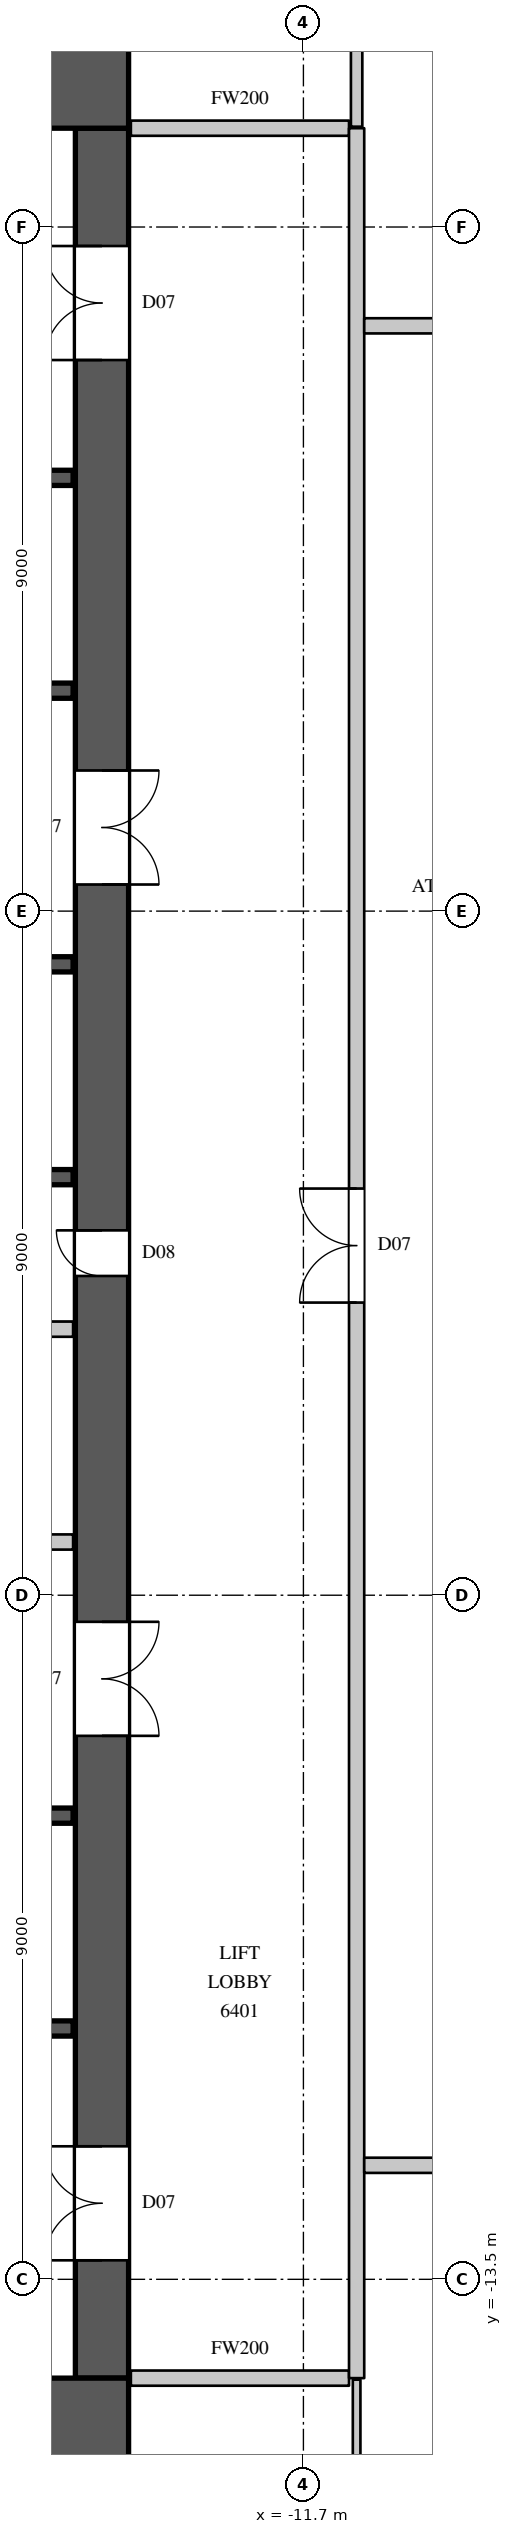
"""IFC4 building model, lengths in metres.
Left out: names, types, materials, properties, quantities, classifications, styles, units other than length and angle.
Written with IfcOpenShell. Run it as: python <this file> out.ifc"""

import sys

from ifc_helpers import new_model, si_unit, direction, frame, frame_2d, origin, place, context, subcontext, project, spatial, rectangle, extrude, element, fill, save


model = new_model("IFC4")
c1 = context("Model", 3, precision=1e-05, world=origin(), true_north=direction((0.0, 1.0)))
c2 = subcontext(c1, "Body", "Model", "MODEL_VIEW")
j1 = project(units=[si_unit("LENGTHUNIT", "METRE"), si_unit("PLANEANGLEUNIT", "RADIAN")], contexts=[c1])
p1 = place(None, origin())
s1 = spatial("IfcSite", under=j1, at=p1, CompositionType="ELEMENT")
p2 = place(p1, origin())
s2 = spatial("IfcBuilding", under=s1, at=p2, CompositionType="ELEMENT")
p3 = place(p2, frame((0.0, 0.0, 284.4)))
s3 = spatial("IfcBuildingStorey", under=s2, at=p3, CompositionType="ELEMENT", Elevation=284.4)
for number, where, z_axis, x_axis in (
    (1, (-30.0, 15.4, 0.0), (0.0, 0.0, 1.0), (1.0, 0.0, 0.0)),
    (2, (-30.0, -15.4, 0.0), (0.0, 0.0, 1.0), (1.0, 0.0, 0.0)),
):
    element("IfcWall", number, at=place(p3, frame(where, z_axis=z_axis, x_axis=x_axis)), inside=s3, PredefinedType="SHEAR", context=c2, shape_type="SweptSolid", body=[
        extrude(rectangle(XDim=16.0, YDim=1.2, at=frame_2d((8.0, 0.0))), origin(), (0.0, 0.0, 1.0), 4.1),
    ])
p4 = place(p3, frame((-14.35, -14.8, 0.0), z_axis=(0.0, 0.0, 1.0), x_axis=(0.0, 1.0, 0.0)))
e3 = element("IfcWall", 3, at=p4, inside=s3, PredefinedType="SHEAR", context=c2, shape_type="SweptSolid", body=[
    extrude(rectangle(XDim=29.6, YDim=0.7, at=frame_2d((14.8, 0.0))), origin(), (0.0, 0.0, 1.0), 4.1),
])
p5 = place(p4, frame((1.55, 0.0, 0.0)))
e4 = element("IfcOpeningElement", 4, at=p5, cuts=e3, PredefinedType="OPENING", context=c2, shape_type="SweptSolid", body=[
    extrude(rectangle(XDim=1.5, YDim=2.4, at=frame_2d((0.75, 1.2))), frame((0.0, 0.36, 0.0), z_axis=(0.0, -1.0, 0.0), x_axis=(1.0, 0.0, 0.0)), (0.0, 0.0, 1.0), 0.72),
])
p6 = place(p4, frame((26.55, 0.0, 0.0)))
e5 = element("IfcOpeningElement", 5, at=p6, cuts=e3, PredefinedType="OPENING", context=c2, shape_type="SweptSolid", body=[
    extrude(rectangle(XDim=1.5, YDim=2.4, at=frame_2d((0.75, 1.2))), frame((0.0, 0.36, 0.0), z_axis=(0.0, -1.0, 0.0), x_axis=(1.0, 0.0, 0.0)), (0.0, 0.0, 1.0), 0.72),
])
p7 = place(p4, frame((8.45, 0.0, 0.0)))
e6 = element("IfcOpeningElement", 6, at=p7, cuts=e3, PredefinedType="OPENING", context=c2, shape_type="SweptSolid", body=[
    extrude(rectangle(XDim=1.5, YDim=2.4, at=frame_2d((0.75, 1.2))), frame((0.0, 0.36, 0.0), z_axis=(0.0, -1.0, 0.0), x_axis=(1.0, 0.0, 0.0)), (0.0, 0.0, 1.0), 0.72),
])
p8 = place(p4, frame((19.65, 0.0, 0.0)))
e7 = element("IfcOpeningElement", 7, at=p8, cuts=e3, PredefinedType="OPENING", context=c2, shape_type="SweptSolid", body=[
    extrude(rectangle(XDim=1.5, YDim=2.4, at=frame_2d((0.75, 1.2))), frame((0.0, 0.36, 0.0), z_axis=(0.0, -1.0, 0.0), x_axis=(1.0, 0.0, 0.0)), (0.0, 0.0, 1.0), 0.72),
])
p9 = place(p4, frame((14.5, 0.0, 0.0)))
e8 = element("IfcOpeningElement", 8, at=p9, cuts=e3, PredefinedType="OPENING", context=c2, shape_type="SweptSolid", body=[
    extrude(rectangle(XDim=0.6, YDim=2.0, at=frame_2d((0.3, 1.0))), frame((0.0, 0.36, 0.0), z_axis=(0.0, -1.0, 0.0), x_axis=(1.0, 0.0, 0.0)), (0.0, 0.0, 1.0), 0.72),
])
p10 = place(p3, frame((-29.27, -3.8, 0.0), z_axis=(0.0, 0.0, 1.0), x_axis=(1.0, 0.0, 0.0)))
e9 = element("IfcWall", 9, at=p10, inside=s3, PredefinedType="PARTITIONING", context=c2, shape_type="SweptSolid", body=[
    extrude(rectangle(XDim=14.54, YDim=0.2, at=frame_2d((7.27, 0.0))), origin(), (0.0, 0.0, 1.0), 3.8),
])
p11 = place(p10, frame((1.15, 0.0, 0.0)))
e10 = element("IfcOpeningElement", 10, at=p11, cuts=e9, PredefinedType="OPENING", context=c2, shape_type="SweptSolid", body=[
    extrude(rectangle(XDim=0.9, YDim=2.2, at=frame_2d((0.45, 1.1))), frame((0.0, 0.11, 0.0), z_axis=(0.0, -1.0, 0.0), x_axis=(1.0, 0.0, 0.0)), (0.0, 0.0, 1.0), 0.22),
])
p12 = place(p10, frame((5.0, 0.0, 0.0)))
e11 = element("IfcOpeningElement", 11, at=p12, cuts=e9, PredefinedType="OPENING", context=c2, shape_type="SweptSolid", body=[
    extrude(rectangle(XDim=0.9, YDim=2.2, at=frame_2d((0.45, 1.1))), frame((0.0, 0.11, 0.0), z_axis=(0.0, -1.0, 0.0), x_axis=(1.0, 0.0, 0.0)), (0.0, 0.0, 1.0), 0.22),
])
p13 = place(p10, frame((10.65, 0.0, 0.0)))
e12 = element("IfcOpeningElement", 12, at=p13, cuts=e9, PredefinedType="OPENING", context=c2, shape_type="SweptSolid", body=[
    extrude(rectangle(XDim=0.9, YDim=2.2, at=frame_2d((0.45, 1.1))), frame((0.0, 0.11, 0.0), z_axis=(0.0, -1.0, 0.0), x_axis=(1.0, 0.0, 0.0)), (0.0, 0.0, 1.0), 0.22),
])
for number, where, z_axis, x_axis in (
    (13, (-13.97, -14.8, 0.0), (0.0, 0.0, 1.0), (1.0, 0.0, 0.0)),
    (14, (-13.97, 14.8, 0.0), (0.0, 0.0, 1.0), (1.0, 0.0, 0.0)),
):
    element("IfcWall", number, at=place(p3, frame(where, z_axis=z_axis, x_axis=x_axis)), inside=s3, PredefinedType="PARTITIONING", context=c2, shape_type="SweptSolid", body=[
        extrude(rectangle(XDim=2.87, YDim=0.2, at=frame_2d((1.435, 0.0))), origin(), (0.0, 0.0, 1.0), 3.8),
    ])
p14 = place(p3, frame((-11.0, -14.8, 0.0), z_axis=(0.0, 0.0, 1.0), x_axis=(0.0, 1.0, 0.0)))
e15 = element("IfcWall", 15, at=p14, inside=s3, PredefinedType="PARTITIONING", context=c2, shape_type="SweptSolid", body=[
    extrude(rectangle(XDim=29.6, YDim=0.2, at=frame_2d((14.8, 0.0))), origin(), (0.0, 0.0, 1.0), 3.8),
])
p15 = place(p14, frame((14.15, 0.0, 0.0)))
e16 = element("IfcOpeningElement", 16, at=p15, cuts=e15, PredefinedType="OPENING", context=c2, shape_type="SweptSolid", body=[
    extrude(rectangle(XDim=1.5, YDim=2.4, at=frame_2d((0.75, 1.2))), frame((0.0, 0.11, 0.0), z_axis=(0.0, -1.0, 0.0), x_axis=(1.0, 0.0, 0.0)), (0.0, 0.0, 1.0), 0.22),
])
p16 = place(p3, frame((-10.9, -12.0, 0.0), z_axis=(0.0, 0.0, 1.0), x_axis=(1.0, 0.0, 0.0)))
e17 = element("IfcWall", 17, at=p16, inside=s3, PredefinedType="PARTITIONING", context=c2, shape_type="SweptSolid", body=[
    extrude(rectangle(XDim=21.8, YDim=0.2, at=frame_2d((10.9, 0.0))), origin(), (0.0, 0.0, 1.0), 3.8),
])
p17 = place(p16, frame((1.1, 0.0, 0.0)))
e18 = element("IfcOpeningElement", 18, at=p17, cuts=e17, PredefinedType="OPENING", context=c2, shape_type="SweptSolid", body=[
    extrude(rectangle(XDim=0.9, YDim=2.2, at=frame_2d((0.45, 1.1))), frame((0.0, 0.11, 0.0), z_axis=(0.0, -1.0, 0.0), x_axis=(1.0, 0.0, 0.0)), (0.0, 0.0, 1.0), 0.22),
])
p18 = place(p16, frame((4.9, 0.0, 0.0)))
e19 = element("IfcOpeningElement", 19, at=p18, cuts=e17, PredefinedType="OPENING", context=c2, shape_type="SweptSolid", body=[
    extrude(rectangle(XDim=0.9, YDim=2.2, at=frame_2d((0.45, 1.1))), frame((0.0, 0.11, 0.0), z_axis=(0.0, -1.0, 0.0), x_axis=(1.0, 0.0, 0.0)), (0.0, 0.0, 1.0), 0.22),
])
p19 = place(p16, frame((7.0, 0.0, 0.0)))
e20 = element("IfcOpeningElement", 20, at=p19, cuts=e17, PredefinedType="OPENING", context=c2, shape_type="SweptSolid", body=[
    extrude(rectangle(XDim=0.9, YDim=2.2, at=frame_2d((0.45, 1.1))), frame((0.0, 0.11, 0.0), z_axis=(0.0, -1.0, 0.0), x_axis=(1.0, 0.0, 0.0)), (0.0, 0.0, 1.0), 0.22),
])
p20 = place(p16, frame((9.95, 0.0, 0.0)))
e21 = element("IfcOpeningElement", 21, at=p20, cuts=e17, PredefinedType="OPENING", context=c2, shape_type="SweptSolid", body=[
    extrude(rectangle(XDim=1.1, YDim=2.4, at=frame_2d((0.55, 1.2))), frame((0.0, 0.11, 0.0), z_axis=(0.0, -1.0, 0.0), x_axis=(1.0, 0.0, 0.0)), (0.0, 0.0, 1.0), 0.22),
])
p21 = place(p3, frame((-10.9, 12.2, 0.0), z_axis=(0.0, 0.0, 1.0), x_axis=(1.0, 0.0, 0.0)))
e22 = element("IfcWall", 22, at=p21, inside=s3, PredefinedType="PARTITIONING", context=c2, shape_type="SweptSolid", body=[
    extrude(rectangle(XDim=3.756, YDim=0.2, at=frame_2d((1.878, 0.0))), origin(), (0.0, 0.0, 1.0), 3.8),
])
p22 = place(p21, frame((0.95, 0.0, 0.0)))
e23 = element("IfcOpeningElement", 23, at=p22, cuts=e22, PredefinedType="OPENING", context=c2, shape_type="SweptSolid", body=[
    extrude(rectangle(XDim=1.1, YDim=2.4, at=frame_2d((0.55, 1.2))), frame((0.0, 0.11, 0.0), z_axis=(0.0, -1.0, 0.0), x_axis=(1.0, 0.0, 0.0)), (0.0, 0.0, 1.0), 0.22),
])
p23 = place(p3, frame((-11.0, 14.82, 0.0), z_axis=(0.0, 0.0, 1.0), x_axis=(0.0, 1.0, 0.0)))
e24 = element("IfcWall", 24, at=p23, inside=s3, PredefinedType="PARTITIONING", context=c2, shape_type="SweptSolid", body=[
    extrude(rectangle(XDim=9.883, YDim=0.15, at=frame_2d((4.942, 0.0))), origin(), (0.0, 0.0, 1.0), 3.8),
])
p24 = place(p3, frame((-29.27, -1.0, 0.0), z_axis=(0.0, 0.0, 1.0), x_axis=(1.0, 0.0, 0.0)))
e25 = element("IfcWall", 25, at=p24, inside=s3, PredefinedType="PARTITIONING", context=c2, shape_type="SweptSolid", body=[
    extrude(rectangle(XDim=14.54, YDim=0.2, at=frame_2d((7.27, 0.0))), origin(), (0.0, 0.0, 1.0), 3.8),
])
p25 = place(p3, frame((-17.92, -10.2, 0.0), z_axis=(0.0, 0.0, 1.0), x_axis=(1.0, 0.0, 0.0)))
e26 = element("IfcWall", 26, at=p25, inside=s3, PredefinedType="SHEAR", context=c2, shape_type="SweptSolid", body=[
    extrude(rectangle(XDim=3.19, YDim=0.2, at=frame_2d((1.595, 0.0))), origin(), (0.0, 0.0, 1.0), 3.8),
])
p26 = place(p25, frame((1.05, 0.0, 0.0)))
e27 = element("IfcOpeningElement", 27, at=p26, cuts=e26, PredefinedType="OPENING", context=c2, shape_type="SweptSolid", body=[
    extrude(rectangle(XDim=1.1, YDim=2.2, at=frame_2d((0.55, 1.1))), frame((0.0, 0.11, 0.0), z_axis=(0.0, -1.0, 0.0), x_axis=(1.0, 0.0, 0.0)), (0.0, 0.0, 1.0), 0.22),
])
for number, where, z_axis, x_axis in (
    (28, (-17.9, -7.4, 0.0), (0.0, 0.0, 1.0), (1.0, 0.0, 0.0)),
    (29, (-17.9, 1.0, 0.0), (0.0, 0.0, 1.0), (1.0, 0.0, 0.0)),
):
    element("IfcWall", number, at=place(p3, frame(where, z_axis=z_axis, x_axis=x_axis)), inside=s3, PredefinedType="SHEAR", context=c2, shape_type="SweptSolid", body=[
        extrude(rectangle(XDim=3.17, YDim=0.2, at=frame_2d((1.585, 0.0))), origin(), (0.0, 0.0, 1.0), 3.8),
    ])
p27 = place(p3, frame((-17.9, 3.8, 0.0), z_axis=(0.0, 0.0, 1.0), x_axis=(1.0, 0.0, 0.0)))
e30 = element("IfcWall", 30, at=p27, inside=s3, PredefinedType="SHEAR", context=c2, shape_type="SweptSolid", body=[
    extrude(rectangle(XDim=3.17, YDim=0.2, at=frame_2d((1.585, 0.0))), origin(), (0.0, 0.0, 1.0), 3.8),
])
p28 = place(p27, frame((1.05, 0.0, 0.0)))
e31 = element("IfcOpeningElement", 31, at=p28, cuts=e30, PredefinedType="OPENING", context=c2, shape_type="SweptSolid", body=[
    extrude(rectangle(XDim=1.1, YDim=2.2, at=frame_2d((0.55, 1.1))), frame((0.0, 0.11, 0.0), z_axis=(0.0, -1.0, 0.0), x_axis=(1.0, 0.0, 0.0)), (0.0, 0.0, 1.0), 0.22),
])
p29 = place(p3, frame((-17.92, 7.4, 0.0), z_axis=(0.0, 0.0, 1.0), x_axis=(1.0, 0.0, 0.0)))
e32 = element("IfcWall", 32, at=p29, inside=s3, PredefinedType="SHEAR", context=c2, shape_type="SweptSolid", body=[
    extrude(rectangle(XDim=3.19, YDim=0.2, at=frame_2d((1.595, 0.0))), origin(), (0.0, 0.0, 1.0), 3.8),
])
p30 = place(p3, frame((-17.92, 10.2, 0.0), z_axis=(0.0, 0.0, 1.0), x_axis=(1.0, 0.0, 0.0)))
e33 = element("IfcWall", 33, at=p30, inside=s3, PredefinedType="SHEAR", context=c2, shape_type="SweptSolid", body=[
    extrude(rectangle(XDim=3.19, YDim=0.2, at=frame_2d((1.595, 0.0))), origin(), (0.0, 0.0, 1.0), 3.8),
])
p31 = place(p30, frame((1.05, 0.0, 0.0)))
e34 = element("IfcOpeningElement", 34, at=p31, cuts=e33, PredefinedType="OPENING", context=c2, shape_type="SweptSolid", body=[
    extrude(rectangle(XDim=1.1, YDim=2.2, at=frame_2d((0.55, 1.1))), frame((0.0, 0.11, 0.0), z_axis=(0.0, -1.0, 0.0), x_axis=(1.0, 0.0, 0.0)), (0.0, 0.0, 1.0), 0.22),
])
p32 = place(p3, frame((-11.0, -23.757, 0.0), z_axis=(0.0, 0.0, 1.0), x_axis=(0.0, 1.0, 0.0)))
e35 = element("IfcWall", 35, at=p32, inside=s3, PredefinedType="PARTITIONING", context=c2, shape_type="SweptSolid", body=[
    extrude(rectangle(XDim=8.937, YDim=0.1, at=frame_2d((4.468, 0.0))), origin(), (0.0, 0.0, 1.0), 3.8),
])
p33 = place(p15, origin())
e36 = element("IfcDoor", 36, at=p33, inside=s3, OperationType="DOUBLE_DOOR_SINGLE_SWING", PredefinedType="DOOR", context=c2, shape_type="SweptSolid", body=[
    extrude(rectangle(XDim=1.5, YDim=2.4, at=frame_2d((0.75, 1.2))), frame((0.0, 0.025, 0.0), z_axis=(0.0, -1.0, 0.0), x_axis=(1.0, 0.0, 0.0)), (0.0, 0.0, 1.0), 0.05),
])
fill(e16, e36)
p34 = place(p5, origin())
e37 = element("IfcDoor", 37, at=p34, inside=s3, OperationType="DOUBLE_DOOR_SINGLE_SWING", PredefinedType="DOOR", context=c2, shape_type="SweptSolid", body=[
    extrude(rectangle(XDim=1.5, YDim=2.4, at=frame_2d((0.75, 1.2))), frame((0.0, 0.345, 0.0), z_axis=(0.0, -1.0, 0.0), x_axis=(1.0, 0.0, 0.0)), (0.0, 0.0, 1.0), 0.05),
])
fill(e4, e37)
p35 = place(p6, origin())
e38 = element("IfcDoor", 38, at=p35, inside=s3, OperationType="DOUBLE_DOOR_SINGLE_SWING", PredefinedType="DOOR", context=c2, shape_type="SweptSolid", body=[
    extrude(rectangle(XDim=1.5, YDim=2.4, at=frame_2d((0.75, 1.2))), frame((0.0, 0.345, 0.0), z_axis=(0.0, -1.0, 0.0), x_axis=(1.0, 0.0, 0.0)), (0.0, 0.0, 1.0), 0.05),
])
fill(e5, e38)
p36 = place(p7, origin())
e39 = element("IfcDoor", 39, at=p36, inside=s3, OperationType="DOUBLE_DOOR_SINGLE_SWING", PredefinedType="DOOR", context=c2, shape_type="SweptSolid", body=[
    extrude(rectangle(XDim=1.5, YDim=2.4, at=frame_2d((0.75, 1.2))), frame((0.0, -0.295, 0.0), z_axis=(0.0, -1.0, 0.0), x_axis=(1.0, 0.0, 0.0)), (0.0, 0.0, 1.0), 0.05),
])
fill(e6, e39)
p37 = place(p8, origin())
e40 = element("IfcDoor", 40, at=p37, inside=s3, OperationType="DOUBLE_DOOR_SINGLE_SWING", PredefinedType="DOOR", context=c2, shape_type="SweptSolid", body=[
    extrude(rectangle(XDim=1.5, YDim=2.4, at=frame_2d((0.75, 1.2))), frame((0.0, -0.295, 0.0), z_axis=(0.0, -1.0, 0.0), x_axis=(1.0, 0.0, 0.0)), (0.0, 0.0, 1.0), 0.05),
])
fill(e7, e40)
p38 = place(p9, origin())
e41 = element("IfcDoor", 41, at=p38, inside=s3, OperationType="SINGLE_SWING_RIGHT", PredefinedType="DOOR", context=c2, shape_type="SweptSolid", body=[
    extrude(rectangle(XDim=0.6, YDim=2.0, at=frame_2d((0.3, 1.0))), frame((0.0, 0.345, 0.0), z_axis=(0.0, -1.0, 0.0), x_axis=(1.0, 0.0, 0.0)), (0.0, 0.0, 1.0), 0.05),
])
fill(e8, e41)
save(model, sys.argv[1])
